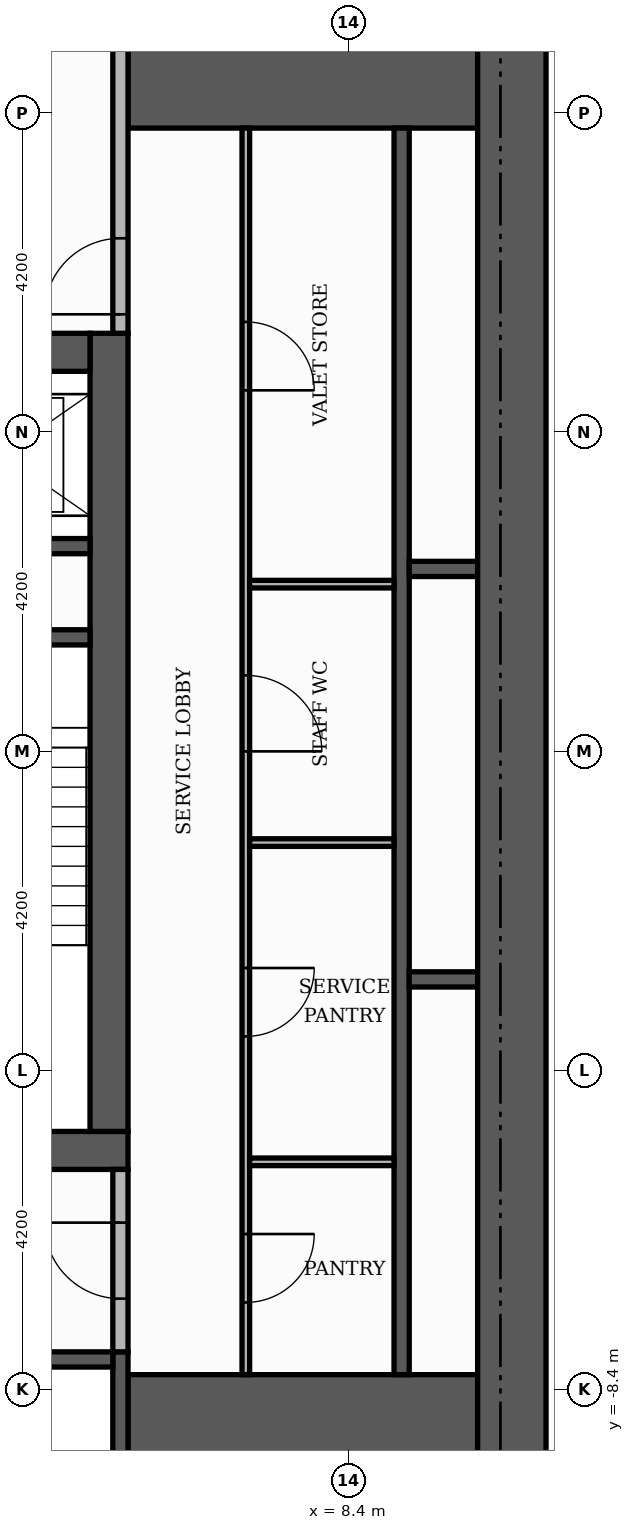
"""IFC4 building model, lengths in metres.
Left out: names, types, materials, properties, quantities, classifications, styles, units other than length and angle.
Written with IfcOpenShell. Run it as: python <this file> out.ifc"""

import sys

from ifc_helpers import new_model, si_unit, direction, frame, frame_2d, origin, place, context, subcontext, project, spatial, rectangle, extrude, element, fill, save


model = new_model("IFC4")
c1 = context("Model", 3, precision=1e-05, world=origin(), true_north=direction((0.0, 1.0)))
c2 = subcontext(c1, "Body", "Model", "MODEL_VIEW")
j1 = project(units=[si_unit("LENGTHUNIT", "METRE"), si_unit("PLANEANGLEUNIT", "RADIAN")], contexts=[c1])
p1 = place(None, origin())
s1 = spatial("IfcSite", under=j1, at=p1, CompositionType="ELEMENT")
p2 = place(p1, origin())
s2 = spatial("IfcBuilding", under=s1, at=p2, CompositionType="ELEMENT")
p3 = place(p2, frame((0.0, 0.0, 83.1)))
s3 = spatial("IfcBuildingStorey", under=s2, at=p3, CompositionType="ELEMENT", Elevation=83.1)
p4 = place(p3, frame((-5.5, -5.25, 0.0), z_axis=(0.0, 0.0, 1.0), x_axis=(1.0, 0.0, 0.0)))
e1 = element("IfcWall", 1, at=p4, inside=s3, PredefinedType="SHEAR", context=c2, shape_type="SweptSolid", body=[
    extrude(rectangle(XDim=11.0, YDim=0.5, at=frame_2d((5.5, 0.0))), origin(), (0.0, 0.0, 1.0), 3.48),
])
p5 = place(p4, frame((4.9, 0.0, 0.0)))
e2 = element("IfcOpeningElement", 2, at=p5, cuts=e1, PredefinedType="OPENING", context=c2, shape_type="SweptSolid", body=[
    extrude(rectangle(XDim=1.2, YDim=2.1, at=frame_2d((0.6, 1.05))), frame((0.0, 0.26, 0.0), z_axis=(0.0, -1.0, 0.0), x_axis=(1.0, 0.0, 0.0)), (0.0, 0.0, 1.0), 0.52),
])
p6 = place(p3, frame((5.25, -5.0, 0.0), z_axis=(0.0, 0.0, 1.0), x_axis=(0.0, 1.0, 0.0)))
e3 = element("IfcWall", 3, at=p6, inside=s3, PredefinedType="SHEAR", context=c2, shape_type="SweptSolid", body=[
    extrude(rectangle(XDim=10.5, YDim=0.5, at=frame_2d((5.25, 0.0))), origin(), (0.0, 0.0, 1.0), 3.48),
])
p7 = place(p3, frame((-5.0, 5.25, 0.0), z_axis=(0.0, 0.0, 1.0), x_axis=(1.0, 0.0, 0.0)))
e4 = element("IfcWall", 4, at=p7, inside=s3, PredefinedType="SHEAR", context=c2, shape_type="SweptSolid", body=[
    extrude(rectangle(XDim=10.0, YDim=0.5, at=frame_2d((5.0, 0.0))), origin(), (0.0, 0.0, 1.0), 3.48),
])
p8 = place(p7, frame((4.4, 0.0, 0.0)))
e5 = element("IfcOpeningElement", 5, at=p8, cuts=e4, PredefinedType="OPENING", context=c2, shape_type="SweptSolid", body=[
    extrude(rectangle(XDim=1.2, YDim=2.1, at=frame_2d((0.6, 1.05))), frame((0.0, 0.26, 0.0), z_axis=(0.0, -1.0, 0.0), x_axis=(1.0, 0.0, 0.0)), (0.0, 0.0, 1.0), 0.52),
])
for number, where, z_axis, x_axis in (
    (6, (5.5, -9.15, 0.0), (0.0, 0.0, 1.0), (1.0, 0.0, 0.0)),
    (7, (5.5, 9.15, 0.0), (0.0, 0.0, 1.0), (1.0, 0.0, 0.0)),
):
    element("IfcWall", number, at=place(p3, frame(where, z_axis=z_axis, x_axis=x_axis)), inside=s3, PredefinedType="SHEAR", context=c2, shape_type="SweptSolid", body=[
        extrude(rectangle(XDim=4.6, YDim=1.9, at=frame_2d((2.3, 0.0))), origin(), (0.0, 0.0, 1.0), 3.48),
    ])
p9 = place(p3, frame((2.15, 1.5, 0.0), z_axis=(0.0, 0.0, 1.0), x_axis=(1.0, 0.0, 0.0)))
e8 = element("IfcWall", 8, at=p9, inside=s3, PredefinedType="SHEAR", context=c2, shape_type="SweptSolid", body=[
    extrude(rectangle(XDim=2.85, YDim=0.2, at=frame_2d((1.425, 0.0))), origin(), (0.0, 0.0, 1.0), 3.48),
])
p10 = place(p3, frame((5.4, -10.1, 0.0), z_axis=(0.0, 0.0, 1.0), x_axis=(0.0, 1.0, 0.0)))
e9 = element("IfcWall", 9, at=p10, inside=s3, PredefinedType="SHEAR", context=c2, shape_type="SweptSolid", body=[
    extrude(rectangle(XDim=2.2, YDim=0.2, at=frame_2d((1.1, 0.0))), origin(), (0.0, 0.0, 1.0), 3.48),
])
p11 = place(p3, frame((9.1, -8.2, 0.0), z_axis=(0.0, 0.0, 1.0), x_axis=(0.0, 1.0, 0.0)))
e10 = element("IfcWall", 10, at=p11, inside=s3, PredefinedType="SHEAR", context=c2, shape_type="SweptSolid", body=[
    extrude(rectangle(XDim=16.4, YDim=0.2, at=frame_2d((8.2, 0.0))), origin(), (0.0, 0.0, 1.0), 3.48),
])
p12 = place(p3, frame((2.8, -8.0, 0.0), z_axis=(0.0, 0.0, 1.0), x_axis=(1.0, 0.0, 0.0)))
e11 = element("IfcWall", 11, at=p12, inside=s3, PredefinedType="SHEAR", context=c2, shape_type="SweptSolid", body=[
    extrude(rectangle(XDim=2.5, YDim=0.2, at=frame_2d((1.25, 0.0))), origin(), (0.0, 0.0, 1.0), 3.48),
])
for number, where, z_axis, x_axis in (
    (12, (9.2, -3.0, 0.0), (0.0, 0.0, 1.0), (1.0, 0.0, 0.0)),
    (13, (9.2, 2.4, 0.0), (0.0, 0.0, 1.0), (1.0, 0.0, 0.0)),
):
    element("IfcWall", number, at=place(p3, frame(where, z_axis=z_axis, x_axis=x_axis)), inside=s3, PredefinedType="SHEAR", context=c2, shape_type="SweptSolid", body=[
        extrude(rectangle(XDim=0.9, YDim=0.2, at=frame_2d((0.45, 0.0))), origin(), (0.0, 0.0, 1.0), 3.48),
    ])
p13 = place(p3, frame((2.15, 2.7, 0.0), z_axis=(0.0, 0.0, 1.0), x_axis=(1.0, 0.0, 0.0)))
e14 = element("IfcWall", 14, at=p13, inside=s3, PredefinedType="SHEAR", context=c2, shape_type="SweptSolid", body=[
    extrude(rectangle(XDim=2.85, YDim=0.2, at=frame_2d((1.425, 0.0))), origin(), (0.0, 0.0, 1.0), 3.48),
])
p14 = place(p3, frame((10.55, -10.1, 0.0), z_axis=(0.0, 0.0, 1.0), x_axis=(0.0, 1.0, 0.0)))
e15 = element("IfcWall", 15, at=p14, inside=s3, PredefinedType="SHEAR", context=c2, shape_type="SweptSolid", body=[
    extrude(rectangle(XDim=20.2, YDim=0.9, at=frame_2d((10.1, 0.0))), origin(), (0.0, 0.0, 1.0), 3.48),
])
p15 = place(p3, frame((7.05, -8.2, 0.0), z_axis=(0.0, 0.0, 1.0), x_axis=(0.0, 1.0, 0.0)))
e16 = element("IfcWall", 16, at=p15, inside=s3, PredefinedType="PARTITIONING", context=c2, shape_type="SweptSolid", body=[
    extrude(rectangle(XDim=16.4, YDim=0.1, at=frame_2d((8.2, 0.0))), origin(), (0.0, 0.0, 1.0), 3.48),
])
p16 = place(p15, frame((0.95, 0.0, 0.0)))
e17 = element("IfcOpeningElement", 17, at=p16, cuts=e16, PredefinedType="OPENING", context=c2, shape_type="SweptSolid", body=[
    extrude(rectangle(XDim=0.9, YDim=2.1, at=frame_2d((0.45, 1.05))), frame((0.0, 0.06, 0.0), z_axis=(0.0, -1.0, 0.0), x_axis=(1.0, 0.0, 0.0)), (0.0, 0.0, 1.0), 0.12),
])
p17 = place(p15, frame((4.45, 0.0, 0.0)))
e18 = element("IfcOpeningElement", 18, at=p17, cuts=e16, PredefinedType="OPENING", context=c2, shape_type="SweptSolid", body=[
    extrude(rectangle(XDim=0.9, YDim=2.1, at=frame_2d((0.45, 1.05))), frame((0.0, 0.06, 0.0), z_axis=(0.0, -1.0, 0.0), x_axis=(1.0, 0.0, 0.0)), (0.0, 0.0, 1.0), 0.12),
])
p18 = place(p15, frame((8.2, 0.0, 0.0)))
e19 = element("IfcOpeningElement", 19, at=p18, cuts=e16, PredefinedType="OPENING", context=c2, shape_type="SweptSolid", body=[
    extrude(rectangle(XDim=1.0, YDim=2.1, at=frame_2d((0.5, 1.05))), frame((0.0, 0.06, 0.0), z_axis=(0.0, -1.0, 0.0), x_axis=(1.0, 0.0, 0.0)), (0.0, 0.0, 1.0), 0.12),
])
p19 = place(p15, frame((12.95, 0.0, 0.0)))
e20 = element("IfcOpeningElement", 20, at=p19, cuts=e16, PredefinedType="OPENING", context=c2, shape_type="SweptSolid", body=[
    extrude(rectangle(XDim=0.9, YDim=2.1, at=frame_2d((0.45, 1.05))), frame((0.0, 0.06, 0.0), z_axis=(0.0, -1.0, 0.0), x_axis=(1.0, 0.0, 0.0)), (0.0, 0.0, 1.0), 0.12),
])
p20 = place(p3, frame((5.4, -7.9, 0.0), z_axis=(0.0, 0.0, 1.0), x_axis=(0.0, 1.0, 0.0)))
e21 = element("IfcWall", 21, at=p20, inside=s3, PredefinedType="PARTITIONING", context=c2, shape_type="SweptSolid", body=[
    extrude(rectangle(XDim=2.4, YDim=0.2, at=frame_2d((1.2, 0.0))), origin(), (0.0, 0.0, 1.0), 3.48),
])
p21 = place(p20, frame((0.7, 0.0, 0.0)))
e22 = element("IfcOpeningElement", 22, at=p21, cuts=e21, PredefinedType="OPENING", context=c2, shape_type="SweptSolid", body=[
    extrude(rectangle(XDim=1.0, YDim=2.1, at=frame_2d((0.5, 1.05))), frame((0.0, 0.11, 0.0), z_axis=(0.0, -1.0, 0.0), x_axis=(1.0, 0.0, 0.0)), (0.0, 0.0, 1.0), 0.22),
])
for number, where, z_axis, x_axis in (
    (23, (7.1, -5.4, 0.0), (0.0, 0.0, 1.0), (1.0, 0.0, 0.0)),
    (24, (7.1, -1.2, 0.0), (0.0, 0.0, 1.0), (1.0, 0.0, 0.0)),
    (25, (7.1, 2.2, 0.0), (0.0, 0.0, 1.0), (1.0, 0.0, 0.0)),
):
    element("IfcWall", number, at=place(p3, frame(where, z_axis=z_axis, x_axis=x_axis)), inside=s3, PredefinedType="PARTITIONING", context=c2, shape_type="SweptSolid", body=[
        extrude(rectangle(XDim=1.9, YDim=0.1, at=frame_2d((0.95, 0.0))), origin(), (0.0, 0.0, 1.0), 3.48),
    ])
p22 = place(p3, frame((5.4, 5.5, 0.0), z_axis=(0.0, 0.0, 1.0), x_axis=(0.0, 1.0, 0.0)))
e26 = element("IfcWall", 26, at=p22, inside=s3, PredefinedType="PARTITIONING", context=c2, shape_type="SweptSolid", body=[
    extrude(rectangle(XDim=4.6, YDim=0.2, at=frame_2d((2.3, 0.0))), origin(), (0.0, 0.0, 1.0), 3.48),
])
p23 = place(p22, frame((0.25, 0.0, 0.0)))
e27 = element("IfcOpeningElement", 27, at=p23, cuts=e26, PredefinedType="OPENING", context=c2, shape_type="SweptSolid", body=[
    extrude(rectangle(XDim=1.0, YDim=2.1, at=frame_2d((0.5, 1.05))), frame((0.0, 0.11, 0.0), z_axis=(0.0, -1.0, 0.0), x_axis=(1.0, 0.0, 0.0)), (0.0, 0.0, 1.0), 0.22),
])
p24 = place(p23, origin())
e28 = element("IfcDoor", 28, at=p24, inside=s3, OperationType="SINGLE_SWING_LEFT", PredefinedType="DOOR", context=c2, shape_type="SweptSolid", body=[
    extrude(rectangle(XDim=1.0, YDim=2.1, at=frame_2d((0.5, 1.05))), frame((0.0, 0.025, 0.0), z_axis=(0.0, -1.0, 0.0), x_axis=(1.0, 0.0, 0.0)), (0.0, 0.0, 1.0), 0.05),
])
fill(e27, e28)
p25 = place(p21, origin())
e29 = element("IfcDoor", 29, at=p25, inside=s3, OperationType="SINGLE_SWING_RIGHT", PredefinedType="DOOR", context=c2, shape_type="SweptSolid", body=[
    extrude(rectangle(XDim=1.0, YDim=2.1, at=frame_2d((0.5, 1.05))), frame((0.0, 0.025, 0.0), z_axis=(0.0, -1.0, 0.0), x_axis=(1.0, 0.0, 0.0)), (0.0, 0.0, 1.0), 0.05),
])
fill(e22, e29)
p26 = place(p16, frame((0.9, 0.0, 0.0), z_axis=(0.0, 0.0, 1.0), x_axis=(-1.0, 0.0, 0.0)))
e30 = element("IfcDoor", 30, at=p26, inside=s3, OperationType="SINGLE_SWING_RIGHT", PredefinedType="DOOR", context=c2, shape_type="SweptSolid", body=[
    extrude(rectangle(XDim=0.9, YDim=2.1, at=frame_2d((0.45, 1.05))), frame((0.0, 0.025, 0.0), z_axis=(0.0, -1.0, 0.0), x_axis=(1.0, 0.0, 0.0)), (0.0, 0.0, 1.0), 0.05),
])
fill(e17, e30)
p27 = place(p17, frame((0.9, 0.0, 0.0), z_axis=(0.0, 0.0, 1.0), x_axis=(-1.0, 0.0, 0.0)))
e31 = element("IfcDoor", 31, at=p27, inside=s3, OperationType="SINGLE_SWING_RIGHT", PredefinedType="DOOR", context=c2, shape_type="SweptSolid", body=[
    extrude(rectangle(XDim=0.9, YDim=2.1, at=frame_2d((0.45, 1.05))), frame((0.0, 0.025, 0.0), z_axis=(0.0, -1.0, 0.0), x_axis=(1.0, 0.0, 0.0)), (0.0, 0.0, 1.0), 0.05),
])
fill(e18, e31)
p28 = place(p18, frame((1.0, 0.0, 0.0), z_axis=(0.0, 0.0, 1.0), x_axis=(-1.0, 0.0, 0.0)))
e32 = element("IfcDoor", 32, at=p28, inside=s3, OperationType="SINGLE_SWING_LEFT", PredefinedType="DOOR", context=c2, shape_type="SweptSolid", body=[
    extrude(rectangle(XDim=1.0, YDim=2.1, at=frame_2d((0.5, 1.05))), frame((0.0, 0.025, 0.0), z_axis=(0.0, -1.0, 0.0), x_axis=(1.0, 0.0, 0.0)), (0.0, 0.0, 1.0), 0.05),
])
fill(e19, e32)
p29 = place(p19, frame((0.9, 0.0, 0.0), z_axis=(0.0, 0.0, 1.0), x_axis=(-1.0, 0.0, 0.0)))
e33 = element("IfcDoor", 33, at=p29, inside=s3, OperationType="SINGLE_SWING_LEFT", PredefinedType="DOOR", context=c2, shape_type="SweptSolid", body=[
    extrude(rectangle(XDim=0.9, YDim=2.1, at=frame_2d((0.45, 1.05))), frame((0.0, 0.025, 0.0), z_axis=(0.0, -1.0, 0.0), x_axis=(1.0, 0.0, 0.0)), (0.0, 0.0, 1.0), 0.05),
])
fill(e20, e33)
save(model, sys.argv[1])
